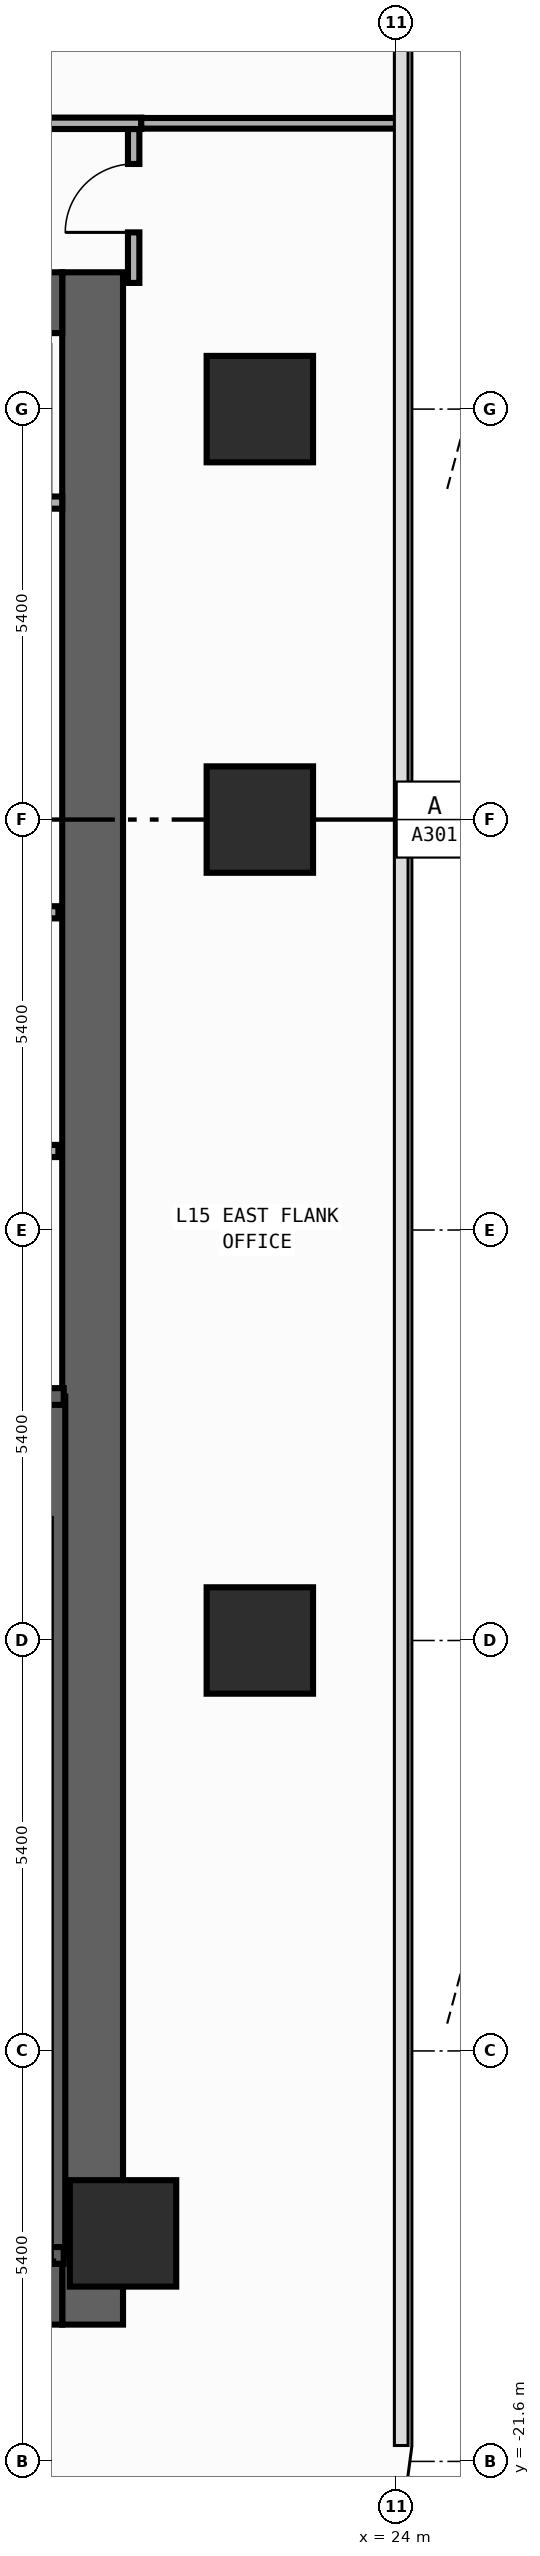
"""IFC4 building model, lengths in metres.
Left out: names, types, materials, properties, quantities, classifications, styles, units other than length and angle.
Written with IfcOpenShell. Run it as: python <this file> out.ifc"""

import sys

from ifc_helpers import new_model, si_unit, direction, frame, frame_2d, origin, origin_2d, place, context, subcontext, project, spatial, rectangle, extrude, element, fill, save


model = new_model("IFC4")
c1 = context("Model", 3, precision=1e-05, world=origin(), true_north=direction((0.0, 1.0)))
c2 = subcontext(c1, "Body", "Model", "MODEL_VIEW")
j1 = project(units=[si_unit("LENGTHUNIT", "METRE"), si_unit("PLANEANGLEUNIT", "RADIAN")], contexts=[c1])
p1 = place(None, origin())
s1 = spatial("IfcSite", under=j1, at=p1, CompositionType="ELEMENT")
p2 = place(p1, origin())
s2 = spatial("IfcBuilding", under=s1, at=p2, CompositionType="ELEMENT")
p3 = place(p2, frame((0.0, 0.0, 63.8)))
s3 = spatial("IfcBuildingStorey", under=s2, at=p3, CompositionType="ELEMENT", Elevation=63.8)
p4 = place(p3, frame((20.0, -19.8, 0.0), z_axis=(0.0, 0.0, 1.0), x_axis=(0.0, 1.0, 0.0)))
e1 = element("IfcWall", 1, at=p4, inside=s3, PredefinedType="SHEAR", context=c2, shape_type="SweptSolid", body=[
    extrude(rectangle(XDim=27.0, YDim=0.8, at=frame_2d((13.5, 0.0))), origin(), (0.0, 0.0, 1.0), 3.94),
])
for number, where, z_axis, x_axis in (
    (2, (12.8, -19.4, 0.0), (0.0, 0.0, 1.0), (1.0, 0.0, 0.0)),
    (3, (12.8, 6.8, 0.0), (0.0, 0.0, 1.0), (1.0, 0.0, 0.0)),
):
    element("IfcWall", number, at=place(p3, frame(where, z_axis=z_axis, x_axis=x_axis)), inside=s3, PredefinedType="SHEAR", context=c2, shape_type="SweptSolid", body=[
        extrude(rectangle(XDim=6.8, YDim=0.8, at=frame_2d((3.4, 0.0))), origin(), (0.0, 0.0, 1.0), 3.94),
    ])
p5 = place(p3, frame((19.53, -18.89, 0.0), z_axis=(0.0, 0.0, 1.0), x_axis=(0.0, 1.0, 0.0)))
e4 = element("IfcWall", 4, at=p5, inside=s3, PredefinedType="SHEAR", context=c2, shape_type="SweptSolid", body=[
    extrude(rectangle(XDim=11.3, YDim=0.22, at=frame_2d((5.65, 0.0))), origin(), (0.0, 0.0, 1.0), 3.94),
])
p6 = place(p3, frame((15.705, -18.89, 0.0), z_axis=(0.0, 0.0, 1.0), x_axis=(1.0, 0.0, 0.0)))
e5 = element("IfcWall", 5, at=p6, inside=s3, PredefinedType="SHEAR", context=c2, shape_type="SweptSolid", body=[
    extrude(rectangle(XDim=3.915, YDim=0.22, at=frame_2d((1.958, 0.0))), origin(), (0.0, 0.0, 1.0), 3.94),
])
p7 = place(p3, frame((19.62, -7.59, 0.0), z_axis=(0.0, 0.0, 1.0), x_axis=(-1.0, 0.0, 0.0)))
e6 = element("IfcWall", 6, at=p7, inside=s3, PredefinedType="SHEAR", context=c2, shape_type="SweptSolid", body=[
    extrude(rectangle(XDim=3.915, YDim=0.22, at=frame_2d((1.958, 0.0))), origin(), (0.0, 0.0, 1.0), 3.94),
])
p8 = place(p7, frame((1.08, 0.0, 0.0)))
e7 = element("IfcOpeningElement", 7, at=p8, cuts=e6, PredefinedType="OPENING", context=c2, shape_type="SweptSolid", body=[
    extrude(rectangle(XDim=1.1, YDim=2.2, at=frame_2d((0.55, 1.1))), frame((0.0, 0.12, 0.0), z_axis=(0.0, -1.0, 0.0), x_axis=(1.0, 0.0, 0.0)), (0.0, 0.0, 1.0), 0.24),
])
for number, where, z_axis, x_axis in (
    (8, (20.4, -18.6, 0.0), (0.0, 0.0, 1.0), (1.0, 0.0, 0.0)),
    (9, (22.2, -10.8, 0.0), (0.0, 0.0, 1.0), (1.0, 0.0, 0.0)),
    (10, (22.2, 0.0, 0.0), (0.0, 0.0, 1.0), (1.0, 0.0, 0.0)),
    (11, (22.2, 5.4, 0.0), (0.0, 0.0, 1.0), (1.0, 0.0, 0.0)),
):
    element("IfcColumn", number, at=place(p3, frame(where, z_axis=z_axis, x_axis=x_axis)), inside=s3, PredefinedType="COLUMN", context=c2, shape_type="SweptSolid", body=[
        extrude(rectangle(XDim=1.4, YDim=1.4, at=origin_2d()), origin(), (0.0, 0.0, 1.0), 4.2),
    ])
p9 = place(p3, frame((15.75, -4.36, 0.0), z_axis=(0.0, 0.0, 1.0), x_axis=(1.0, 0.0, 0.0)))
e12 = element("IfcWall", 12, at=p9, inside=s3, PredefinedType="STANDARD", context=c2, shape_type="SweptSolid", body=[
    extrude(rectangle(XDim=3.8, YDim=0.16, at=frame_2d((1.9, 0.0))), origin(), (0.0, 0.0, 1.0), 3.94),
])
p10 = place(p9, frame((1.47, 0.0, 0.0)))
e13 = element("IfcOpeningElement", 13, at=p10, cuts=e12, PredefinedType="OPENING", context=c2, shape_type="SweptSolid", body=[
    extrude(rectangle(XDim=1.15, YDim=2.2, at=frame_2d((0.575, 1.1))), frame((0.0, 0.09, 0.0), z_axis=(0.0, -1.0, 0.0), x_axis=(1.0, 0.0, 0.0)), (0.0, 0.0, 1.0), 0.18),
])
p11 = place(p3, frame((15.75, -1.22, 0.0), z_axis=(0.0, 0.0, 1.0), x_axis=(1.0, 0.0, 0.0)))
e14 = element("IfcWall", 14, at=p11, inside=s3, PredefinedType="STANDARD", context=c2, shape_type="SweptSolid", body=[
    extrude(rectangle(XDim=3.8, YDim=0.16, at=frame_2d((1.9, 0.0))), origin(), (0.0, 0.0, 1.0), 3.94),
])
p12 = place(p3, frame((17.31, 4.17, 0.0), z_axis=(0.0, 0.0, 1.0), x_axis=(1.0, 0.0, 0.0)))
e15 = element("IfcWall", 15, at=p12, inside=s3, PredefinedType="PARTITIONING", context=c2, shape_type="SweptSolid", body=[
    extrude(rectangle(XDim=2.29, YDim=0.16, at=frame_2d((1.145, 0.0))), origin(), (0.0, 0.0, 1.0), 3.94),
])
p13 = place(p3, frame((20.54, 7.06, 0.0), z_axis=(0.0, 0.0, 1.0), x_axis=(0.0, 1.0, 0.0)))
e16 = element("IfcWall", 16, at=p13, inside=s3, PredefinedType="PARTITIONING", context=c2, shape_type="SweptSolid", body=[
    extrude(rectangle(XDim=2.025, YDim=0.15, at=frame_2d((1.012, 0.0))), origin(), (0.0, 0.0, 1.0), 3.94),
])
p14 = place(p13, frame((0.665, 0.0, 0.0)))
e17 = element("IfcOpeningElement", 17, at=p14, cuts=e16, PredefinedType="OPENING", context=c2, shape_type="SweptSolid", body=[
    extrude(rectangle(XDim=0.9, YDim=2.15, at=frame_2d((0.45, 1.075))), frame((0.0, 0.085, 0.0), z_axis=(0.0, -1.0, 0.0), x_axis=(1.0, 0.0, 0.0)), (0.0, 0.0, 1.0), 0.17),
])
p15 = place(p3, frame((11.81, 9.16, 0.0), z_axis=(0.0, 0.0, 1.0), x_axis=(1.0, 0.0, 0.0)))
e18 = element("IfcWall", 18, at=p15, inside=s3, PredefinedType="PARTITIONING", context=c2, shape_type="SweptSolid", body=[
    extrude(rectangle(XDim=8.83, YDim=0.15, at=frame_2d((4.415, 0.0))), origin(), (0.0, 0.0, 1.0), 3.94),
])
p16 = place(p15, frame((5.067, 0.0, 0.0)))
e19 = element("IfcOpeningElement", 19, at=p16, cuts=e18, PredefinedType="OPENING", context=c2, shape_type="SweptSolid", body=[
    extrude(rectangle(XDim=0.9, YDim=2.15, at=frame_2d((0.45, 1.075))), frame((0.0, 0.085, 0.0), z_axis=(0.0, -1.0, 0.0), x_axis=(1.0, 0.0, 0.0)), (0.0, 0.0, 1.0), 0.17),
])
p17 = place(p3, frame((20.64, 9.16, 0.0), z_axis=(0.0, 0.0, 1.0), x_axis=(1.0, 0.0, 0.0)))
e20 = element("IfcWall", 20, at=p17, inside=s3, PredefinedType="PARTITIONING", context=c2, shape_type="SweptSolid", body=[
    extrude(rectangle(XDim=3.415, YDim=0.14, at=frame_2d((1.708, 0.0))), origin(), (0.0, 0.0, 1.0), 3.94),
])
p18 = place(p14, origin())
e21 = element("IfcDoor", 21, at=p18, inside=s3, OperationType="SINGLE_SWING_LEFT", PredefinedType="DOOR", context=c2, shape_type="SweptSolid", body=[
    extrude(rectangle(XDim=0.9, YDim=2.15, at=frame_2d((0.45, 1.075))), frame((0.0, 0.025, 0.0), z_axis=(0.0, -1.0, 0.0), x_axis=(1.0, 0.0, 0.0)), (0.0, 0.0, 1.0), 0.05),
])
fill(e17, e21)
save(model, sys.argv[1])
